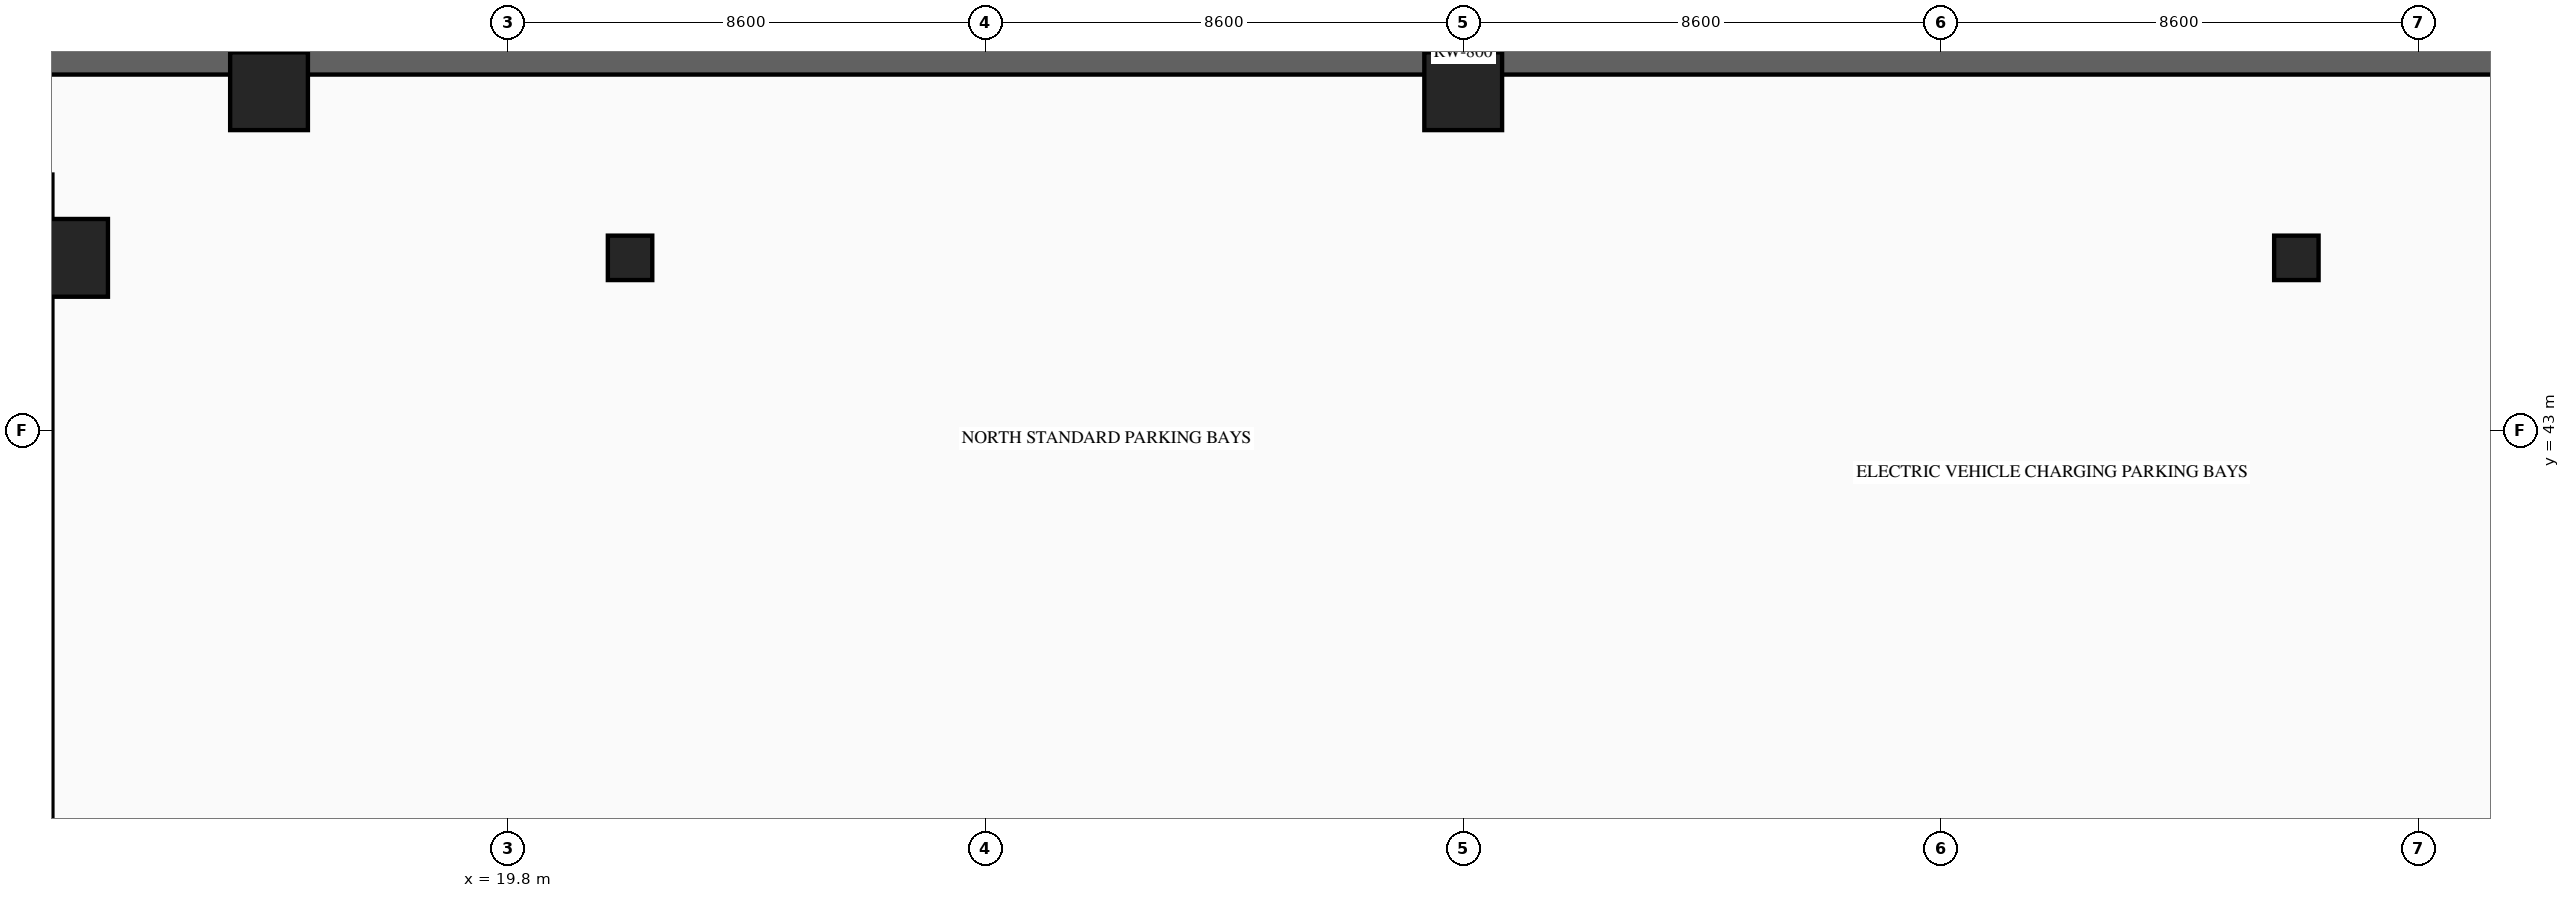
"""IFC4 building model, lengths in metres.
Left out: names, types, materials, properties, quantities, classifications, styles, units other than length and angle.
Written with IfcOpenShell. Run it as: python <this file> out.ifc"""

import sys

from ifc_helpers import new_model, si_unit, direction, frame, frame_2d, origin, origin_2d, place, context, subcontext, project, spatial, rectangle, extrude, source, transform, mapped, element, save


model = new_model("IFC4")
c1 = context("Model", 3, precision=1e-05, world=origin(), true_north=direction((0.0, 1.0)))
c2 = subcontext(c1, "Body", "Model", "MODEL_VIEW")
j1 = project(units=[si_unit("LENGTHUNIT", "METRE"), si_unit("PLANEANGLEUNIT", "RADIAN")], contexts=[c1])
p1 = place(None, origin())
s1 = spatial("IfcSite", under=j1, at=p1, CompositionType="ELEMENT")
p2 = place(p1, origin())
s2 = spatial("IfcBuilding", under=s1, at=p2, CompositionType="ELEMENT")
p3 = place(p2, frame((0.0, 0.0, -9.0)))
s3 = spatial("IfcBuildingStorey", under=s2, at=p3, CompositionType="ELEMENT", Elevation=-9.0)
m1 = source(origin(), c2, "Body", "SweptSolid", [
    extrude(rectangle(XDim=70.8, YDim=0.8, at=frame_2d((35.4, 0.0))), origin(), (0.0, 0.0, 1.0), 4.5),
])
p4 = place(p3, frame((1.6, 49.8, 0.0), z_axis=(0.0, 0.0, 1.0), x_axis=(1.0, 0.0, 0.0)))
e1 = element("IfcWall", 1, at=p4, inside=s3, PredefinedType="USERDEFINED", context=c2, shape_type="MappedRepresentation", body=[
    mapped(m1, transform((0.0, 0.0, 0.0), scale=1.0)),
])
m2 = source(origin(), c2, "Body", "SweptSolid", [
    extrude(rectangle(XDim=0.8, YDim=0.8, at=origin_2d()), origin(), (0.0, 0.0, 1.0), 4.2),
])
for number, where, z_axis, x_axis in (
    (2, (22.0, 46.1, 0.0), (0.0, 0.0, 1.0), (1.0, 0.0, 0.0)),
    (3, (52.0, 46.1, 0.0), (0.0, 0.0, 1.0), (1.0, 0.0, 0.0)),
):
    element("IfcColumn", number, at=place(p3, frame(where, z_axis=z_axis, x_axis=x_axis)), inside=s3, PredefinedType="COLUMN", context=c2, shape_type="MappedRepresentation", body=[
        mapped(m2, transform((0.0, 0.0, 0.0), scale=1.0)),
    ])
m3 = source(origin(), c2, "Body", "SweptSolid", [
    extrude(rectangle(XDim=1.4, YDim=1.4, at=origin_2d()), origin(), (0.0, 0.0, 1.0), 4.5),
])
for number, where, z_axis, x_axis in (
    (4, (11.9, 46.1, 0.0), (0.0, 0.0, 1.0), (1.0, 0.0, 0.0)),
    (5, (15.5, 49.1, 0.0), (0.0, 0.0, 1.0), (1.0, 0.0, 0.0)),
    (6, (37.0, 49.1, 0.0), (0.0, 0.0, 1.0), (1.0, 0.0, 0.0)),
):
    element("IfcColumn", number, at=place(p3, frame(where, z_axis=z_axis, x_axis=x_axis)), inside=s3, PredefinedType="COLUMN", context=c2, shape_type="MappedRepresentation", body=[
        mapped(m3, transform((0.0, 0.0, 0.0), scale=1.0)),
    ])
save(model, sys.argv[1])
